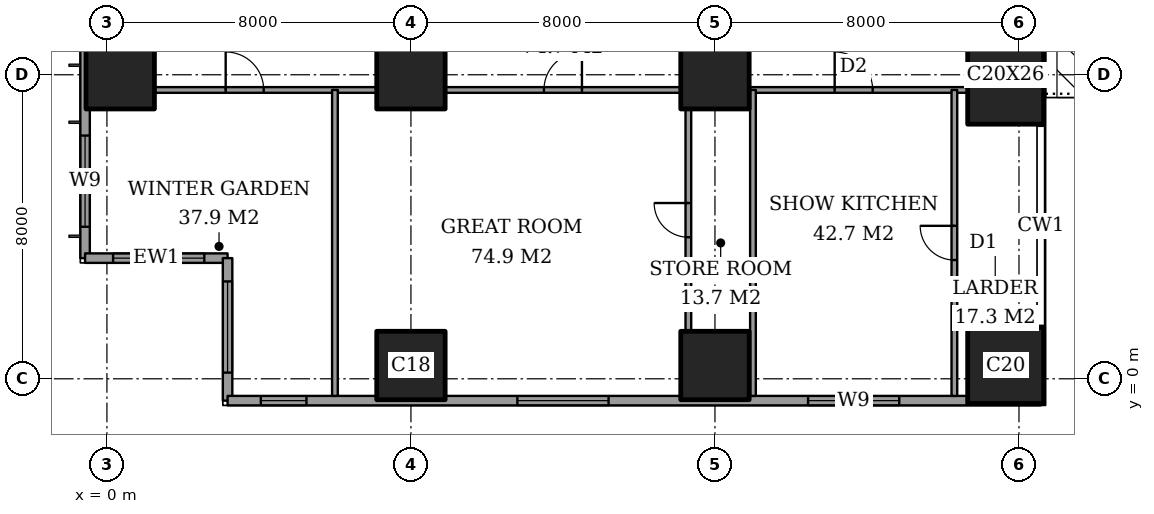
"""IFC4 building model, lengths in metres.
Left out: names, types, materials, properties, quantities, classifications, styles, units other than length and angle.
Written with IfcOpenShell. Run it as: python <this file> out.ifc"""

import sys

from ifc_helpers import new_model, si_unit, direction, frame, frame_2d, origin, origin_2d, place, context, subcontext, project, spatial, rectangle, extrude, element, fill, save


model = new_model("IFC4")
c1 = context("Model", 3, precision=1e-05, world=origin(), true_north=direction((0.0, 1.0)))
c2 = subcontext(c1, "Body", "Model", "MODEL_VIEW")
j1 = project(units=[si_unit("LENGTHUNIT", "METRE"), si_unit("PLANEANGLEUNIT", "RADIAN")], contexts=[c1])
p1 = place(None, origin())
s1 = spatial("IfcSite", under=j1, at=p1, CompositionType="ELEMENT")
p2 = place(p1, origin())
s2 = spatial("IfcBuilding", under=s1, at=p2, CompositionType="ELEMENT")
p3 = place(p2, frame((0.0, 0.0, 182.2)))
s3 = spatial("IfcBuildingStorey", under=s2, at=p3, CompositionType="ELEMENT", Elevation=182.2)
for number, where, z_axis, x_axis in (
    (1, (0.35, 8.0, 0.0), (0.0, 0.0, 1.0), (1.0, 0.0, 0.0)),
    (2, (8.0, 0.35, 0.0), (0.0, 0.0, 1.0), (1.0, 0.0, 0.0)),
    (3, (8.0, 8.0, 0.0), (0.0, 0.0, 1.0), (1.0, 0.0, 0.0)),
    (4, (16.0, 0.35, 0.0), (0.0, 0.0, 1.0), (1.0, 0.0, 0.0)),
    (5, (16.0, 8.0, 0.0), (0.0, 0.0, 1.0), (1.0, 0.0, 0.0)),
):
    element("IfcColumn", number, at=place(p3, frame(where, z_axis=z_axis, x_axis=x_axis)), inside=s3, PredefinedType="COLUMN", context=c2, shape_type="SweptSolid", body=[
        extrude(rectangle(XDim=1.8, YDim=1.8, at=origin_2d()), origin(), (0.0, 0.0, 1.0), 3.6),
    ])
p4 = place(p3, frame((23.65, 0.35, 0.0), z_axis=(0.0, 0.0, 1.0), x_axis=(1.0, 0.0, 0.0)))
e6 = element("IfcColumn", 6, at=p4, inside=s3, PredefinedType="COLUMN", context=c2, shape_type="SweptSolid", body=[
    extrude(rectangle(XDim=2.0, YDim=2.0, at=origin_2d()), origin(), (0.0, 0.0, 1.0), 3.6),
])
p5 = place(p3, frame((23.65, 8.0, 0.0), z_axis=(0.0, 0.0, 1.0), x_axis=(1.0, 0.0, 0.0)))
e7 = element("IfcColumn", 7, at=p5, inside=s3, PredefinedType="COLUMN", context=c2, shape_type="SweptSolid", body=[
    extrude(rectangle(XDim=2.0, YDim=2.6, at=origin_2d()), origin(), (0.0, 0.0, 1.0), 3.6),
])
p6 = place(p3, frame((-0.575, 44.825, 0.0), z_axis=(0.0, 0.0, 1.0), x_axis=(0.0, -1.0, 0.0)))
e8 = element("IfcWall", 8, at=p6, inside=s3, PredefinedType="SOLIDWALL", context=c2, shape_type="SweptSolid", body=[
    extrude(rectangle(XDim=41.65, YDim=0.25, at=frame_2d((20.825, 0.0))), origin(), (0.0, 0.0, 1.0), 3.6),
])
p7 = place(p6, frame((0.825, 0.0, 0.2)))
e9 = element("IfcOpeningElement", 9, at=p7, cuts=e8, PredefinedType="OPENING", context=c2, shape_type="SweptSolid", body=[
    extrude(rectangle(XDim=2.4, YDim=2.4, at=frame_2d((1.2, 1.2))), frame((0.0, 0.135, 0.0), z_axis=(0.0, -1.0, 0.0), x_axis=(1.0, 0.0, 0.0)), (0.0, 0.0, 1.0), 0.27),
])
p8 = place(p6, frame((6.05, 0.0, 0.2)))
e10 = element("IfcOpeningElement", 10, at=p8, cuts=e8, PredefinedType="OPENING", context=c2, shape_type="SweptSolid", body=[
    extrude(rectangle(XDim=1.2, YDim=2.4, at=frame_2d((0.6, 1.2))), frame((0.0, 0.135, 0.0), z_axis=(0.0, -1.0, 0.0), x_axis=(1.0, 0.0, 0.0)), (0.0, 0.0, 1.0), 0.27),
])
p9 = place(p6, frame((8.475, 0.0, 0.2)))
e11 = element("IfcOpeningElement", 11, at=p9, cuts=e8, PredefinedType="OPENING", context=c2, shape_type="SweptSolid", body=[
    extrude(rectangle(XDim=2.4, YDim=2.4, at=frame_2d((1.2, 1.2))), frame((0.0, 0.135, 0.0), z_axis=(0.0, -1.0, 0.0), x_axis=(1.0, 0.0, 0.0)), (0.0, 0.0, 1.0), 0.27),
])
p10 = place(p6, frame((15.625, 0.0, 0.2)))
e12 = element("IfcOpeningElement", 12, at=p10, cuts=e8, PredefinedType="OPENING", context=c2, shape_type="SweptSolid", body=[
    extrude(rectangle(XDim=2.4, YDim=2.4, at=frame_2d((1.2, 1.2))), frame((0.0, 0.135, 0.0), z_axis=(0.0, -1.0, 0.0), x_axis=(1.0, 0.0, 0.0)), (0.0, 0.0, 1.0), 0.27),
])
p11 = place(p6, frame((23.625, 0.0, 0.2)))
e13 = element("IfcOpeningElement", 13, at=p11, cuts=e8, PredefinedType="OPENING", context=c2, shape_type="SweptSolid", body=[
    extrude(rectangle(XDim=2.4, YDim=2.4, at=frame_2d((1.2, 1.2))), frame((0.0, 0.135, 0.0), z_axis=(0.0, -1.0, 0.0), x_axis=(1.0, 0.0, 0.0)), (0.0, 0.0, 1.0), 0.27),
])
p12 = place(p6, frame((30.775, 0.0, 0.2)))
e14 = element("IfcOpeningElement", 14, at=p12, cuts=e8, PredefinedType="OPENING", context=c2, shape_type="SweptSolid", body=[
    extrude(rectangle(XDim=2.4, YDim=2.4, at=frame_2d((1.2, 1.2))), frame((0.0, 0.135, 0.0), z_axis=(0.0, -1.0, 0.0), x_axis=(1.0, 0.0, 0.0)), (0.0, 0.0, 1.0), 0.27),
])
p13 = place(p6, frame((34.55, 0.0, 0.2)))
e15 = element("IfcOpeningElement", 15, at=p13, cuts=e8, PredefinedType="OPENING", context=c2, shape_type="SweptSolid", body=[
    extrude(rectangle(XDim=1.2, YDim=2.4, at=frame_2d((0.6, 1.2))), frame((0.0, 0.135, 0.0), z_axis=(0.0, -1.0, 0.0), x_axis=(1.0, 0.0, 0.0)), (0.0, 0.0, 1.0), 0.27),
])
p14 = place(p6, frame((38.425, 0.0, 0.2)))
e16 = element("IfcOpeningElement", 16, at=p14, cuts=e8, PredefinedType="OPENING", context=c2, shape_type="SweptSolid", body=[
    extrude(rectangle(XDim=2.4, YDim=2.4, at=frame_2d((1.2, 1.2))), frame((0.0, 0.135, 0.0), z_axis=(0.0, -1.0, 0.0), x_axis=(1.0, 0.0, 0.0)), (0.0, 0.0, 1.0), 0.27),
])
p15 = place(p3, frame((-0.575, 3.175, 0.0), z_axis=(0.0, 0.0, 1.0), x_axis=(1.0, 0.0, 0.0)))
e17 = element("IfcWall", 17, at=p15, inside=s3, PredefinedType="SOLIDWALL", context=c2, shape_type="SweptSolid", body=[
    extrude(rectangle(XDim=3.75, YDim=0.25, at=frame_2d((1.875, 0.0))), origin(), (0.0, 0.0, 1.0), 3.6),
])
p16 = place(p15, frame((0.738, 0.0, 0.2)))
e18 = element("IfcOpeningElement", 18, at=p16, cuts=e17, PredefinedType="OPENING", context=c2, shape_type="SweptSolid", body=[
    extrude(rectangle(XDim=2.4, YDim=2.4, at=frame_2d((1.2, 1.2))), frame((0.0, 0.135, 0.0), z_axis=(0.0, -1.0, 0.0), x_axis=(1.0, 0.0, 0.0)), (0.0, 0.0, 1.0), 0.27),
])
p17 = place(p3, frame((3.175, 3.175, 0.0), z_axis=(0.0, 0.0, 1.0), x_axis=(0.0, -1.0, 0.0)))
e19 = element("IfcWall", 19, at=p17, inside=s3, PredefinedType="SOLIDWALL", context=c2, shape_type="SweptSolid", body=[
    extrude(rectangle(XDim=3.75, YDim=0.25, at=frame_2d((1.875, 0.0))), origin(), (0.0, 0.0, 1.0), 3.6),
])
p18 = place(p17, frame((0.613, 0.0, 0.2)))
e20 = element("IfcOpeningElement", 20, at=p18, cuts=e19, PredefinedType="OPENING", context=c2, shape_type="SweptSolid", body=[
    extrude(rectangle(XDim=2.4, YDim=2.4, at=frame_2d((1.2, 1.2))), frame((0.0, 0.135, 0.0), z_axis=(0.0, -1.0, 0.0), x_axis=(1.0, 0.0, 0.0)), (0.0, 0.0, 1.0), 0.27),
])
p19 = place(p3, frame((3.175, -0.575, 0.0), z_axis=(0.0, 0.0, 1.0), x_axis=(1.0, 0.0, 0.0)))
e21 = element("IfcWall", 21, at=p19, inside=s3, PredefinedType="SOLIDWALL", context=c2, shape_type="SweptSolid", body=[
    extrude(rectangle(XDim=21.4, YDim=0.25, at=frame_2d((10.7, 0.0))), origin(), (0.0, 0.0, 1.0), 3.6),
])
p20 = place(p19, frame((0.875, 0.0, 0.2)))
e22 = element("IfcOpeningElement", 22, at=p20, cuts=e21, PredefinedType="OPENING", context=c2, shape_type="SweptSolid", body=[
    extrude(rectangle(XDim=1.2, YDim=2.4, at=frame_2d((0.6, 1.2))), frame((0.0, 0.135, 0.0), z_axis=(0.0, -1.0, 0.0), x_axis=(1.0, 0.0, 0.0)), (0.0, 0.0, 1.0), 0.27),
])
p21 = place(p19, frame((7.625, 0.0, 0.2)))
e23 = element("IfcOpeningElement", 23, at=p21, cuts=e21, PredefinedType="OPENING", context=c2, shape_type="SweptSolid", body=[
    extrude(rectangle(XDim=2.4, YDim=2.4, at=frame_2d((1.2, 1.2))), frame((0.0, 0.135, 0.0), z_axis=(0.0, -1.0, 0.0), x_axis=(1.0, 0.0, 0.0)), (0.0, 0.0, 1.0), 0.27),
])
p22 = place(p19, frame((15.275, 0.0, 0.2)))
e24 = element("IfcOpeningElement", 24, at=p22, cuts=e21, PredefinedType="OPENING", context=c2, shape_type="SweptSolid", body=[
    extrude(rectangle(XDim=2.4, YDim=2.4, at=frame_2d((1.2, 1.2))), frame((0.0, 0.135, 0.0), z_axis=(0.0, -1.0, 0.0), x_axis=(1.0, 0.0, 0.0)), (0.0, 0.0, 1.0), 0.27),
])
p23 = place(p3, frame((1.25, 7.6, 0.0), z_axis=(0.0, 0.0, 1.0), x_axis=(1.0, 0.0, 0.0)))
e25 = element("IfcWall", 25, at=p23, inside=s3, PredefinedType="PARTITIONING", context=c2, shape_type="SweptSolid", body=[
    extrude(rectangle(XDim=5.85, YDim=0.15, at=frame_2d((2.925, 0.0))), origin(), (0.0, 0.0, 1.0), 3.35),
])
p24 = place(p23, frame((1.875, 0.0, 0.0)))
e26 = element("IfcOpeningElement", 26, at=p24, cuts=e25, PredefinedType="OPENING", context=c2, shape_type="SweptSolid", body=[
    extrude(rectangle(XDim=1.0, YDim=2.1, at=frame_2d((0.5, 1.05))), frame((0.0, 0.085, 0.0), z_axis=(0.0, -1.0, 0.0), x_axis=(1.0, 0.0, 0.0)), (0.0, 0.0, 1.0), 0.17),
])
p25 = place(p3, frame((8.9, 7.6, 0.0), z_axis=(0.0, 0.0, 1.0), x_axis=(1.0, 0.0, 0.0)))
e27 = element("IfcWall", 27, at=p25, inside=s3, PredefinedType="PARTITIONING", context=c2, shape_type="SweptSolid", body=[
    extrude(rectangle(XDim=6.2, YDim=0.15, at=frame_2d((3.1, 0.0))), origin(), (0.0, 0.0, 1.0), 3.35),
])
p26 = place(p25, frame((2.6, 0.0, 0.0)))
e28 = element("IfcOpeningElement", 28, at=p26, cuts=e27, PredefinedType="OPENING", context=c2, shape_type="SweptSolid", body=[
    extrude(rectangle(XDim=1.0, YDim=2.1, at=frame_2d((0.5, 1.05))), frame((0.0, 0.085, 0.0), z_axis=(0.0, -1.0, 0.0), x_axis=(1.0, 0.0, 0.0)), (0.0, 0.0, 1.0), 0.17),
])
p27 = place(p3, frame((16.9, 7.6, 0.0), z_axis=(0.0, 0.0, 1.0), x_axis=(1.0, 0.0, 0.0)))
e29 = element("IfcWall", 29, at=p27, inside=s3, PredefinedType="PARTITIONING", context=c2, shape_type="SweptSolid", body=[
    extrude(rectangle(XDim=5.75, YDim=0.15, at=frame_2d((2.875, 0.0))), origin(), (0.0, 0.0, 1.0), 3.35),
])
p28 = place(p27, frame((2.25, 0.0, 0.0)))
e30 = element("IfcOpeningElement", 30, at=p28, cuts=e29, PredefinedType="OPENING", context=c2, shape_type="SweptSolid", body=[
    extrude(rectangle(XDim=1.0, YDim=2.1, at=frame_2d((0.5, 1.05))), frame((0.0, 0.085, 0.0), z_axis=(0.0, -1.0, 0.0), x_axis=(1.0, 0.0, 0.0)), (0.0, 0.0, 1.0), 0.17),
])
p29 = place(p3, frame((6.0, -0.45, 0.0), z_axis=(0.0, 0.0, 1.0), x_axis=(0.0, 1.0, 0.0)))
e31 = element("IfcWall", 31, at=p29, inside=s3, PredefinedType="PARTITIONING", context=c2, shape_type="SweptSolid", body=[
    extrude(rectangle(XDim=8.05, YDim=0.15, at=frame_2d((4.025, 0.0))), origin(), (0.0, 0.0, 1.0), 3.35),
])
p30 = place(p3, frame((15.3, 1.25, 0.0), z_axis=(0.0, 0.0, 1.0), x_axis=(0.0, 1.0, 0.0)))
e32 = element("IfcWall", 32, at=p30, inside=s3, PredefinedType="PARTITIONING", context=c2, shape_type="SweptSolid", body=[
    extrude(rectangle(XDim=5.85, YDim=0.15, at=frame_2d((2.925, 0.0))), origin(), (0.0, 0.0, 1.0), 3.35),
])
p31 = place(p30, frame((2.475, 0.0, 0.0)))
e33 = element("IfcOpeningElement", 33, at=p31, cuts=e32, PredefinedType="OPENING", context=c2, shape_type="SweptSolid", body=[
    extrude(rectangle(XDim=0.9, YDim=2.1, at=frame_2d((0.45, 1.05))), frame((0.0, 0.085, 0.0), z_axis=(0.0, -1.0, 0.0), x_axis=(1.0, 0.0, 0.0)), (0.0, 0.0, 1.0), 0.17),
])
p32 = place(p3, frame((17.0, -0.45, 0.0), z_axis=(0.0, 0.0, 1.0), x_axis=(0.0, 1.0, 0.0)))
e34 = element("IfcWall", 34, at=p32, inside=s3, PredefinedType="PARTITIONING", context=c2, shape_type="SweptSolid", body=[
    extrude(rectangle(XDim=8.05, YDim=0.15, at=frame_2d((4.025, 0.0))), origin(), (0.0, 0.0, 1.0), 3.35),
])
p33 = place(p3, frame((22.3, -0.45, 0.0), z_axis=(0.0, 0.0, 1.0), x_axis=(0.0, 1.0, 0.0)))
e35 = element("IfcWall", 35, at=p33, inside=s3, PredefinedType="PARTITIONING", context=c2, shape_type="SweptSolid", body=[
    extrude(rectangle(XDim=8.05, YDim=0.15, at=frame_2d((4.025, 0.0))), origin(), (0.0, 0.0, 1.0), 3.35),
])
p34 = place(p33, frame((3.575, 0.0, 0.0)))
e36 = element("IfcOpeningElement", 36, at=p34, cuts=e35, PredefinedType="OPENING", context=c2, shape_type="SweptSolid", body=[
    extrude(rectangle(XDim=0.9, YDim=2.1, at=frame_2d((0.45, 1.05))), frame((0.0, 0.085, 0.0), z_axis=(0.0, -1.0, 0.0), x_axis=(1.0, 0.0, 0.0)), (0.0, 0.0, 1.0), 0.17),
])
p35 = place(p14, origin())
e37 = element("IfcWindow", 37, at=p35, inside=s3, PartitioningType="SINGLE_PANEL", PredefinedType="WINDOW", context=c2, shape_type="SweptSolid", body=[
    extrude(rectangle(XDim=2.4, YDim=2.4, at=frame_2d((1.2, 1.2))), frame((0.0, 0.03, 0.0), z_axis=(0.0, -1.0, 0.0), x_axis=(1.0, 0.0, 0.0)), (0.0, 0.0, 1.0), 0.06),
])
fill(e16, e37)
p36 = place(p16, origin())
e38 = element("IfcWindow", 38, at=p36, inside=s3, PartitioningType="SINGLE_PANEL", PredefinedType="WINDOW", context=c2, shape_type="SweptSolid", body=[
    extrude(rectangle(XDim=2.4, YDim=2.4, at=frame_2d((1.2, 1.2))), frame((0.0, 0.03, 0.0), z_axis=(0.0, -1.0, 0.0), x_axis=(1.0, 0.0, 0.0)), (0.0, 0.0, 1.0), 0.06),
])
fill(e18, e38)
p37 = place(p18, origin())
e39 = element("IfcWindow", 39, at=p37, inside=s3, PartitioningType="SINGLE_PANEL", PredefinedType="WINDOW", context=c2, shape_type="SweptSolid", body=[
    extrude(rectangle(XDim=2.4, YDim=2.4, at=frame_2d((1.2, 1.2))), frame((0.0, 0.03, 0.0), z_axis=(0.0, -1.0, 0.0), x_axis=(1.0, 0.0, 0.0)), (0.0, 0.0, 1.0), 0.06),
])
fill(e20, e39)
p38 = place(p20, origin())
e40 = element("IfcWindow", 40, at=p38, inside=s3, PartitioningType="SINGLE_PANEL", PredefinedType="WINDOW", context=c2, shape_type="SweptSolid", body=[
    extrude(rectangle(XDim=1.2, YDim=2.4, at=frame_2d((0.6, 1.2))), frame((0.0, 0.03, 0.0), z_axis=(0.0, -1.0, 0.0), x_axis=(1.0, 0.0, 0.0)), (0.0, 0.0, 1.0), 0.06),
])
fill(e22, e40)
p39 = place(p21, origin())
e41 = element("IfcWindow", 41, at=p39, inside=s3, PartitioningType="SINGLE_PANEL", PredefinedType="WINDOW", context=c2, shape_type="SweptSolid", body=[
    extrude(rectangle(XDim=2.4, YDim=2.4, at=frame_2d((1.2, 1.2))), frame((0.0, 0.03, 0.0), z_axis=(0.0, -1.0, 0.0), x_axis=(1.0, 0.0, 0.0)), (0.0, 0.0, 1.0), 0.06),
])
fill(e23, e41)
p40 = place(p22, origin())
e42 = element("IfcWindow", 42, at=p40, inside=s3, PartitioningType="SINGLE_PANEL", PredefinedType="WINDOW", context=c2, shape_type="SweptSolid", body=[
    extrude(rectangle(XDim=2.4, YDim=2.4, at=frame_2d((1.2, 1.2))), frame((0.0, 0.03, 0.0), z_axis=(0.0, -1.0, 0.0), x_axis=(1.0, 0.0, 0.0)), (0.0, 0.0, 1.0), 0.06),
])
fill(e24, e42)
p41 = place(p24, origin())
e43 = element("IfcDoor", 43, at=p41, inside=s3, OperationType="SINGLE_SWING_RIGHT", PredefinedType="DOOR", context=c2, shape_type="SweptSolid", body=[
    extrude(rectangle(XDim=1.0, YDim=2.1, at=frame_2d((0.5, 1.05))), frame((0.0, 0.025, 0.0), z_axis=(0.0, -1.0, 0.0), x_axis=(1.0, 0.0, 0.0)), (0.0, 0.0, 1.0), 0.05),
])
fill(e26, e43)
p42 = place(p26, origin())
e44 = element("IfcDoor", 44, at=p42, inside=s3, OperationType="SINGLE_SWING_LEFT", PredefinedType="DOOR", context=c2, shape_type="SweptSolid", body=[
    extrude(rectangle(XDim=1.0, YDim=2.1, at=frame_2d((0.5, 1.05))), frame((0.0, 0.025, 0.0), z_axis=(0.0, -1.0, 0.0), x_axis=(1.0, 0.0, 0.0)), (0.0, 0.0, 1.0), 0.05),
])
fill(e28, e44)
p43 = place(p31, origin())
e45 = element("IfcDoor", 45, at=p43, inside=s3, OperationType="SINGLE_SWING_LEFT", PredefinedType="DOOR", context=c2, shape_type="SweptSolid", body=[
    extrude(rectangle(XDim=0.9, YDim=2.1, at=frame_2d((0.45, 1.05))), frame((0.0, 0.025, 0.0), z_axis=(0.0, -1.0, 0.0), x_axis=(1.0, 0.0, 0.0)), (0.0, 0.0, 1.0), 0.05),
])
fill(e33, e45)
p44 = place(p28, origin())
e46 = element("IfcDoor", 46, at=p44, inside=s3, OperationType="SINGLE_SWING_RIGHT", PredefinedType="DOOR", context=c2, shape_type="SweptSolid", body=[
    extrude(rectangle(XDim=1.0, YDim=2.1, at=frame_2d((0.5, 1.05))), frame((0.0, 0.025, 0.0), z_axis=(0.0, -1.0, 0.0), x_axis=(1.0, 0.0, 0.0)), (0.0, 0.0, 1.0), 0.05),
])
fill(e30, e46)
p45 = place(p34, origin())
e47 = element("IfcDoor", 47, at=p45, inside=s3, OperationType="SINGLE_SWING_LEFT", PredefinedType="DOOR", context=c2, shape_type="SweptSolid", body=[
    extrude(rectangle(XDim=0.9, YDim=2.1, at=frame_2d((0.45, 1.05))), frame((0.0, 0.025, 0.0), z_axis=(0.0, -1.0, 0.0), x_axis=(1.0, 0.0, 0.0)), (0.0, 0.0, 1.0), 0.05),
])
fill(e36, e47)
save(model, sys.argv[1])
